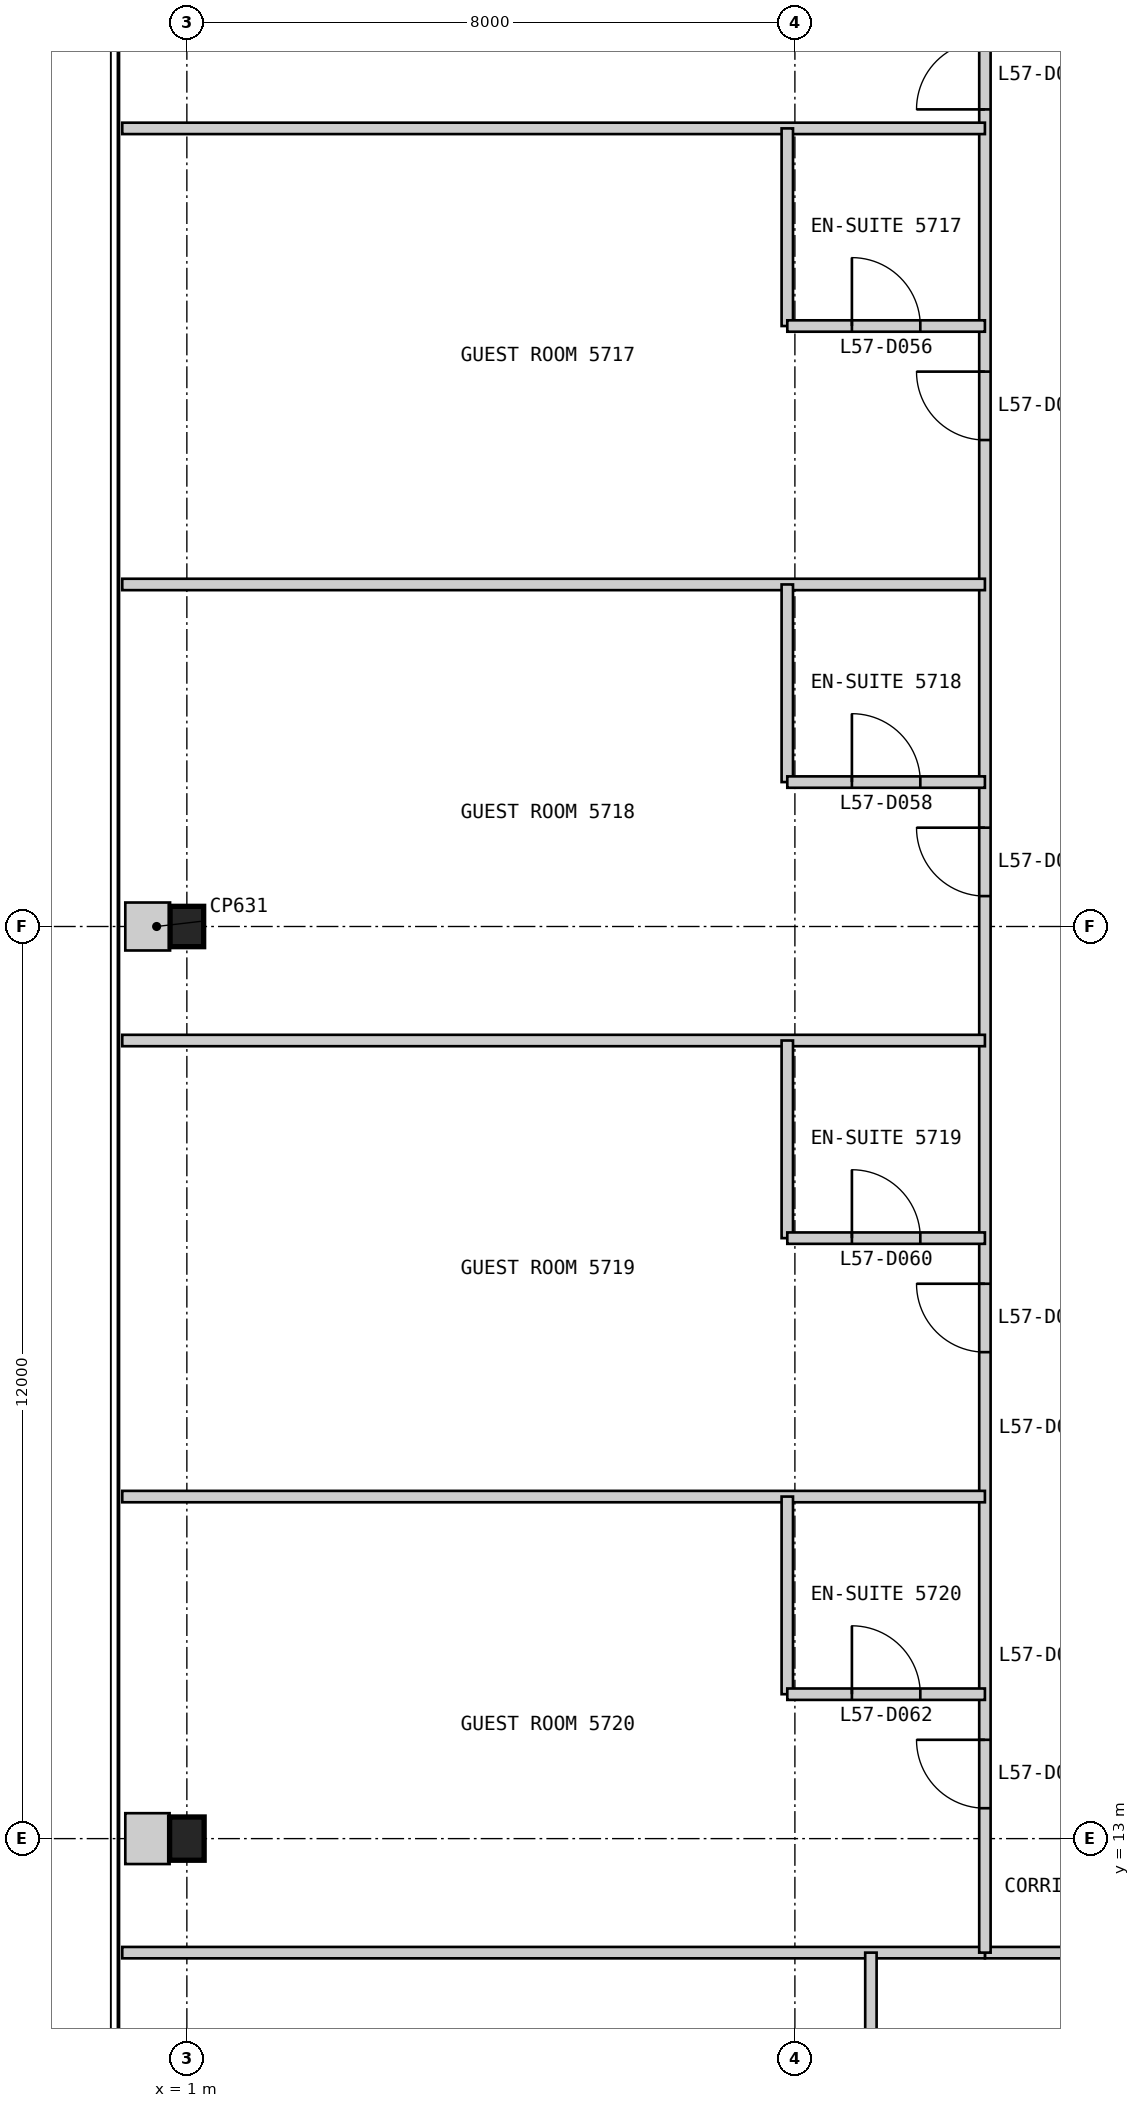
"""IFC4 building model, lengths in metres.
Left out: names, types, materials, properties, quantities, classifications, styles, units other than length and angle.
Written with IfcOpenShell. Run it as: python <this file> out.ifc"""

import sys

from ifc_helpers import new_model, si_unit, direction, frame, frame_2d, origin, origin_2d, place, context, subcontext, project, spatial, rectangle, i_section, extrude, element, fill, save


model = new_model("IFC4")
c1 = context("Model", 3, precision=1e-05, world=origin(), true_north=direction((0.0, 1.0)))
c2 = subcontext(c1, "Body", "Model", "MODEL_VIEW")
j1 = project(units=[si_unit("LENGTHUNIT", "METRE"), si_unit("PLANEANGLEUNIT", "RADIAN")], contexts=[c1])
p1 = place(None, origin())
s1 = spatial("IfcSite", under=j1, at=p1, CompositionType="ELEMENT")
p2 = place(p1, origin())
s2 = spatial("IfcBuilding", under=s1, at=p2, CompositionType="ELEMENT")
p3 = place(p2, frame((0.0, 0.0, 245.8)))
s3 = spatial("IfcBuildingStorey", under=s2, at=p3, CompositionType="ELEMENT", Elevation=245.8)
p4 = place(p3, frame((1.0, 25.0, 0.0), z_axis=(0.0, 0.0, 1.0), x_axis=(1.0, 0.0, 0.0)))
e1 = element("IfcColumn", 1, at=p4, inside=s3, PredefinedType="COLUMN", context=c2, shape_type="SweptSolid", body=[
    extrude(i_section(OverallWidth=0.442, OverallDepth=0.531, WebThickness=0.066, FlangeThickness=0.106, at=origin_2d()), origin(), (0.0, 0.0, 1.0), 3.4),
])
p5 = place(p3, frame((1.0, 13.0, 0.0), z_axis=(0.0, 0.0, 1.0), x_axis=(1.0, 0.0, 0.0)))
e2 = element("IfcColumn", 2, at=p5, inside=s3, PredefinedType="COLUMN", context=c2, shape_type="SweptSolid", body=[
    extrude(i_section(OverallWidth=0.455, OverallDepth=0.569, WebThickness=0.078, FlangeThickness=0.125, at=origin_2d()), origin(), (0.0, 0.0, 1.0), 3.4),
])
p6 = place(p3, frame((11.5, 11.5, 0.0), z_axis=(0.0, 0.0, 1.0), x_axis=(1.0, 0.0, 0.0)))
e3 = element("IfcWall", 3, at=p6, inside=s3, PredefinedType="PARTITIONING", context=c2, shape_type="SweptSolid", body=[
    extrude(rectangle(XDim=27.0, YDim=0.15, at=frame_2d((13.5, 0.0))), origin(), (0.0, 0.0, 1.0), 3.25),
])
p7 = place(p6, frame((1.85, 0.0, 0.0)))
e4 = element("IfcOpeningElement", 4, at=p7, cuts=e3, PredefinedType="OPENING", context=c2, shape_type="SweptSolid", body=[
    extrude(rectangle(XDim=0.9, YDim=2.1, at=frame_2d((0.45, 1.05))), frame((0.0, 0.085, 0.0), z_axis=(0.0, -1.0, 0.0), x_axis=(1.0, 0.0, 0.0)), (0.0, 0.0, 1.0), 0.17),
])
p8 = place(p6, frame((6.2, 0.0, 0.0)))
e5 = element("IfcOpeningElement", 5, at=p8, cuts=e3, PredefinedType="OPENING", context=c2, shape_type="SweptSolid", body=[
    extrude(rectangle(XDim=0.9, YDim=2.1, at=frame_2d((0.45, 1.05))), frame((0.0, 0.085, 0.0), z_axis=(0.0, -1.0, 0.0), x_axis=(1.0, 0.0, 0.0)), (0.0, 0.0, 1.0), 0.17),
])
p9 = place(p6, frame((12.2, 0.0, 0.0)))
e6 = element("IfcOpeningElement", 6, at=p9, cuts=e3, PredefinedType="OPENING", context=c2, shape_type="SweptSolid", body=[
    extrude(rectangle(XDim=0.9, YDim=2.1, at=frame_2d((0.45, 1.05))), frame((0.0, 0.085, 0.0), z_axis=(0.0, -1.0, 0.0), x_axis=(1.0, 0.0, 0.0)), (0.0, 0.0, 1.0), 0.17),
])
p10 = place(p6, frame((18.8, 0.0, 0.0)))
e7 = element("IfcOpeningElement", 7, at=p10, cuts=e3, PredefinedType="OPENING", context=c2, shape_type="SweptSolid", body=[
    extrude(rectangle(XDim=1.0, YDim=2.1, at=frame_2d((0.5, 1.05))), frame((0.0, 0.085, 0.0), z_axis=(0.0, -1.0, 0.0), x_axis=(1.0, 0.0, 0.0)), (0.0, 0.0, 1.0), 0.17),
])
p11 = place(p6, frame((24.2, 0.0, 0.0)))
e8 = element("IfcOpeningElement", 8, at=p11, cuts=e3, PredefinedType="OPENING", context=c2, shape_type="SweptSolid", body=[
    extrude(rectangle(XDim=0.9, YDim=2.1, at=frame_2d((0.45, 1.05))), frame((0.0, 0.085, 0.0), z_axis=(0.0, -1.0, 0.0), x_axis=(1.0, 0.0, 0.0)), (0.0, 0.0, 1.0), 0.17),
])
p12 = place(p3, frame((0.15, 11.5, 0.0), z_axis=(0.0, 0.0, 1.0), x_axis=(1.0, 0.0, 0.0)))
e9 = element("IfcWall", 9, at=p12, inside=s3, PredefinedType="PARTITIONING", context=c2, shape_type="SweptSolid", body=[
    extrude(rectangle(XDim=11.35, YDim=0.15, at=frame_2d((5.675, 0.0))), origin(), (0.0, 0.0, 1.0), 3.25),
])
p13 = place(p3, frame((10.0, 8.9, 0.0), z_axis=(0.0, 0.0, 1.0), x_axis=(0.0, 1.0, 0.0)))
e10 = element("IfcWall", 10, at=p13, inside=s3, PredefinedType="PARTITIONING", context=c2, shape_type="SweptSolid", body=[
    extrude(rectangle(XDim=2.6, YDim=0.15, at=frame_2d((1.3, 0.0))), origin(), (0.0, 0.0, 1.0), 3.25),
])
p14 = place(p3, frame((11.5, 38.5, 0.0), z_axis=(0.0, 0.0, 1.0), x_axis=(0.0, -1.0, 0.0)))
e11 = element("IfcWall", 11, at=p14, inside=s3, PredefinedType="PARTITIONING", context=c2, shape_type="SweptSolid", body=[
    extrude(rectangle(XDim=27.0, YDim=0.15, at=frame_2d((13.5, 0.0))), origin(), (0.0, 0.0, 1.0), 3.25),
])
p15 = place(p14, frame((1.85, 0.0, 0.0)))
e12 = element("IfcOpeningElement", 12, at=p15, cuts=e11, PredefinedType="OPENING", context=c2, shape_type="SweptSolid", body=[
    extrude(rectangle(XDim=0.9, YDim=2.1, at=frame_2d((0.45, 1.05))), frame((0.0, 0.085, 0.0), z_axis=(0.0, -1.0, 0.0), x_axis=(1.0, 0.0, 0.0)), (0.0, 0.0, 1.0), 0.17),
])
p16 = place(p14, frame((6.2, 0.0, 0.0)))
e13 = element("IfcOpeningElement", 13, at=p16, cuts=e11, PredefinedType="OPENING", context=c2, shape_type="SweptSolid", body=[
    extrude(rectangle(XDim=0.9, YDim=2.1, at=frame_2d((0.45, 1.05))), frame((0.0, 0.085, 0.0), z_axis=(0.0, -1.0, 0.0), x_axis=(1.0, 0.0, 0.0)), (0.0, 0.0, 1.0), 0.17),
])
p17 = place(p14, frame((12.2, 0.0, 0.0)))
e14 = element("IfcOpeningElement", 14, at=p17, cuts=e11, PredefinedType="OPENING", context=c2, shape_type="SweptSolid", body=[
    extrude(rectangle(XDim=0.9, YDim=2.1, at=frame_2d((0.45, 1.05))), frame((0.0, 0.085, 0.0), z_axis=(0.0, -1.0, 0.0), x_axis=(1.0, 0.0, 0.0)), (0.0, 0.0, 1.0), 0.17),
])
p18 = place(p14, frame((18.2, 0.0, 0.0)))
e15 = element("IfcOpeningElement", 15, at=p18, cuts=e11, PredefinedType="OPENING", context=c2, shape_type="SweptSolid", body=[
    extrude(rectangle(XDim=0.9, YDim=2.1, at=frame_2d((0.45, 1.05))), frame((0.0, 0.085, 0.0), z_axis=(0.0, -1.0, 0.0), x_axis=(1.0, 0.0, 0.0)), (0.0, 0.0, 1.0), 0.17),
])
p19 = place(p14, frame((24.2, 0.0, 0.0)))
e16 = element("IfcOpeningElement", 16, at=p19, cuts=e11, PredefinedType="OPENING", context=c2, shape_type="SweptSolid", body=[
    extrude(rectangle(XDim=0.9, YDim=2.1, at=frame_2d((0.45, 1.05))), frame((0.0, 0.085, 0.0), z_axis=(0.0, -1.0, 0.0), x_axis=(1.0, 0.0, 0.0)), (0.0, 0.0, 1.0), 0.17),
])
p20 = place(p3, frame((0.15, 35.5, 0.0), z_axis=(0.0, 0.0, 1.0), x_axis=(1.0, 0.0, 0.0)))
e17 = element("IfcWall", 17, at=p20, inside=s3, PredefinedType="PARTITIONING", context=c2, shape_type="SweptSolid", body=[
    extrude(rectangle(XDim=11.35, YDim=0.15, at=frame_2d((5.675, 0.0))), origin(), (0.0, 0.0, 1.0), 3.25),
])
p21 = place(p3, frame((8.9, 35.5, 0.0), z_axis=(0.0, 0.0, 1.0), x_axis=(0.0, -1.0, 0.0)))
e18 = element("IfcWall", 18, at=p21, inside=s3, PredefinedType="PARTITIONING", context=c2, shape_type="SweptSolid", body=[
    extrude(rectangle(XDim=2.6, YDim=0.15, at=frame_2d((1.3, 0.0))), origin(), (0.0, 0.0, 1.0), 3.25),
])
p22 = place(p3, frame((8.9, 32.9, 0.0), z_axis=(0.0, 0.0, 1.0), x_axis=(1.0, 0.0, 0.0)))
e19 = element("IfcWall", 19, at=p22, inside=s3, PredefinedType="PARTITIONING", context=c2, shape_type="SweptSolid", body=[
    extrude(rectangle(XDim=2.6, YDim=0.15, at=frame_2d((1.3, 0.0))), origin(), (0.0, 0.0, 1.0), 3.25),
])
p23 = place(p22, frame((0.85, 0.0, 0.0)))
e20 = element("IfcOpeningElement", 20, at=p23, cuts=e19, PredefinedType="OPENING", context=c2, shape_type="SweptSolid", body=[
    extrude(rectangle(XDim=0.9, YDim=2.1, at=frame_2d((0.45, 1.05))), frame((0.0, 0.085, 0.0), z_axis=(0.0, -1.0, 0.0), x_axis=(1.0, 0.0, 0.0)), (0.0, 0.0, 1.0), 0.17),
])
p24 = place(p3, frame((0.15, 29.5, 0.0), z_axis=(0.0, 0.0, 1.0), x_axis=(1.0, 0.0, 0.0)))
e21 = element("IfcWall", 21, at=p24, inside=s3, PredefinedType="PARTITIONING", context=c2, shape_type="SweptSolid", body=[
    extrude(rectangle(XDim=11.35, YDim=0.15, at=frame_2d((5.675, 0.0))), origin(), (0.0, 0.0, 1.0), 3.25),
])
p25 = place(p3, frame((8.9, 29.5, 0.0), z_axis=(0.0, 0.0, 1.0), x_axis=(0.0, -1.0, 0.0)))
e22 = element("IfcWall", 22, at=p25, inside=s3, PredefinedType="PARTITIONING", context=c2, shape_type="SweptSolid", body=[
    extrude(rectangle(XDim=2.6, YDim=0.15, at=frame_2d((1.3, 0.0))), origin(), (0.0, 0.0, 1.0), 3.25),
])
p26 = place(p3, frame((8.9, 26.9, 0.0), z_axis=(0.0, 0.0, 1.0), x_axis=(1.0, 0.0, 0.0)))
e23 = element("IfcWall", 23, at=p26, inside=s3, PredefinedType="PARTITIONING", context=c2, shape_type="SweptSolid", body=[
    extrude(rectangle(XDim=2.6, YDim=0.15, at=frame_2d((1.3, 0.0))), origin(), (0.0, 0.0, 1.0), 3.25),
])
p27 = place(p26, frame((0.85, 0.0, 0.0)))
e24 = element("IfcOpeningElement", 24, at=p27, cuts=e23, PredefinedType="OPENING", context=c2, shape_type="SweptSolid", body=[
    extrude(rectangle(XDim=0.9, YDim=2.1, at=frame_2d((0.45, 1.05))), frame((0.0, 0.085, 0.0), z_axis=(0.0, -1.0, 0.0), x_axis=(1.0, 0.0, 0.0)), (0.0, 0.0, 1.0), 0.17),
])
p28 = place(p3, frame((0.15, 23.5, 0.0), z_axis=(0.0, 0.0, 1.0), x_axis=(1.0, 0.0, 0.0)))
e25 = element("IfcWall", 25, at=p28, inside=s3, PredefinedType="PARTITIONING", context=c2, shape_type="SweptSolid", body=[
    extrude(rectangle(XDim=11.35, YDim=0.15, at=frame_2d((5.675, 0.0))), origin(), (0.0, 0.0, 1.0), 3.25),
])
p29 = place(p3, frame((8.9, 23.5, 0.0), z_axis=(0.0, 0.0, 1.0), x_axis=(0.0, -1.0, 0.0)))
e26 = element("IfcWall", 26, at=p29, inside=s3, PredefinedType="PARTITIONING", context=c2, shape_type="SweptSolid", body=[
    extrude(rectangle(XDim=2.6, YDim=0.15, at=frame_2d((1.3, 0.0))), origin(), (0.0, 0.0, 1.0), 3.25),
])
p30 = place(p3, frame((8.9, 20.9, 0.0), z_axis=(0.0, 0.0, 1.0), x_axis=(1.0, 0.0, 0.0)))
e27 = element("IfcWall", 27, at=p30, inside=s3, PredefinedType="PARTITIONING", context=c2, shape_type="SweptSolid", body=[
    extrude(rectangle(XDim=2.6, YDim=0.15, at=frame_2d((1.3, 0.0))), origin(), (0.0, 0.0, 1.0), 3.25),
])
p31 = place(p30, frame((0.85, 0.0, 0.0)))
e28 = element("IfcOpeningElement", 28, at=p31, cuts=e27, PredefinedType="OPENING", context=c2, shape_type="SweptSolid", body=[
    extrude(rectangle(XDim=0.9, YDim=2.1, at=frame_2d((0.45, 1.05))), frame((0.0, 0.085, 0.0), z_axis=(0.0, -1.0, 0.0), x_axis=(1.0, 0.0, 0.0)), (0.0, 0.0, 1.0), 0.17),
])
p32 = place(p3, frame((0.15, 17.5, 0.0), z_axis=(0.0, 0.0, 1.0), x_axis=(1.0, 0.0, 0.0)))
e29 = element("IfcWall", 29, at=p32, inside=s3, PredefinedType="PARTITIONING", context=c2, shape_type="SweptSolid", body=[
    extrude(rectangle(XDim=11.35, YDim=0.15, at=frame_2d((5.675, 0.0))), origin(), (0.0, 0.0, 1.0), 3.25),
])
p33 = place(p3, frame((8.9, 17.5, 0.0), z_axis=(0.0, 0.0, 1.0), x_axis=(0.0, -1.0, 0.0)))
e30 = element("IfcWall", 30, at=p33, inside=s3, PredefinedType="PARTITIONING", context=c2, shape_type="SweptSolid", body=[
    extrude(rectangle(XDim=2.6, YDim=0.15, at=frame_2d((1.3, 0.0))), origin(), (0.0, 0.0, 1.0), 3.25),
])
p34 = place(p3, frame((8.9, 14.9, 0.0), z_axis=(0.0, 0.0, 1.0), x_axis=(1.0, 0.0, 0.0)))
e31 = element("IfcWall", 31, at=p34, inside=s3, PredefinedType="PARTITIONING", context=c2, shape_type="SweptSolid", body=[
    extrude(rectangle(XDim=2.6, YDim=0.15, at=frame_2d((1.3, 0.0))), origin(), (0.0, 0.0, 1.0), 3.25),
])
p35 = place(p34, frame((0.85, 0.0, 0.0)))
e32 = element("IfcOpeningElement", 32, at=p35, cuts=e31, PredefinedType="OPENING", context=c2, shape_type="SweptSolid", body=[
    extrude(rectangle(XDim=0.9, YDim=2.1, at=frame_2d((0.45, 1.05))), frame((0.0, 0.085, 0.0), z_axis=(0.0, -1.0, 0.0), x_axis=(1.0, 0.0, 0.0)), (0.0, 0.0, 1.0), 0.17),
])
p36 = place(p3, frame((0.19, 25.0, 0.0), z_axis=(0.0, 0.0, 1.0), x_axis=(1.0, 0.0, 0.0)))
e33 = element("IfcWall", 33, at=p36, inside=s3, PredefinedType="PARTITIONING", context=c2, shape_type="SweptSolid", body=[
    extrude(rectangle(XDim=0.589, YDim=0.631, at=frame_2d((0.294, 0.0))), origin(), (0.0, 0.0, 1.0), 3.25),
])
p37 = place(p3, frame((0.19, 13.0, 0.0), z_axis=(0.0, 0.0, 1.0), x_axis=(1.0, 0.0, 0.0)))
e34 = element("IfcWall", 34, at=p37, inside=s3, PredefinedType="PARTITIONING", context=c2, shape_type="SweptSolid", body=[
    extrude(rectangle(XDim=0.583, YDim=0.669, at=frame_2d((0.292, 0.0))), origin(), (0.0, 0.0, 1.0), 3.25),
])
p38 = place(p15, frame((0.9, 0.0, 0.0), z_axis=(0.0, 0.0, 1.0), x_axis=(-1.0, 0.0, 0.0)))
e35 = element("IfcDoor", 35, at=p38, inside=s3, OperationType="SINGLE_SWING_LEFT", PredefinedType="DOOR", context=c2, shape_type="SweptSolid", body=[
    extrude(rectangle(XDim=0.9, YDim=2.1, at=frame_2d((0.45, 1.05))), frame((0.0, 0.025, 0.0), z_axis=(0.0, -1.0, 0.0), x_axis=(1.0, 0.0, 0.0)), (0.0, 0.0, 1.0), 0.05),
])
fill(e12, e35)
p39 = place(p23, origin())
e36 = element("IfcDoor", 36, at=p39, inside=s3, OperationType="SINGLE_SWING_LEFT", PredefinedType="DOOR", context=c2, shape_type="SweptSolid", body=[
    extrude(rectangle(XDim=0.9, YDim=2.1, at=frame_2d((0.45, 1.05))), frame((0.0, 0.025, 0.0), z_axis=(0.0, -1.0, 0.0), x_axis=(1.0, 0.0, 0.0)), (0.0, 0.0, 1.0), 0.05),
])
fill(e20, e36)
p40 = place(p16, frame((0.9, 0.0, 0.0), z_axis=(0.0, 0.0, 1.0), x_axis=(-1.0, 0.0, 0.0)))
e37 = element("IfcDoor", 37, at=p40, inside=s3, OperationType="SINGLE_SWING_RIGHT", PredefinedType="DOOR", context=c2, shape_type="SweptSolid", body=[
    extrude(rectangle(XDim=0.9, YDim=2.1, at=frame_2d((0.45, 1.05))), frame((0.0, 0.025, 0.0), z_axis=(0.0, -1.0, 0.0), x_axis=(1.0, 0.0, 0.0)), (0.0, 0.0, 1.0), 0.05),
])
fill(e13, e37)
p41 = place(p27, origin())
e38 = element("IfcDoor", 38, at=p41, inside=s3, OperationType="SINGLE_SWING_LEFT", PredefinedType="DOOR", context=c2, shape_type="SweptSolid", body=[
    extrude(rectangle(XDim=0.9, YDim=2.1, at=frame_2d((0.45, 1.05))), frame((0.0, 0.025, 0.0), z_axis=(0.0, -1.0, 0.0), x_axis=(1.0, 0.0, 0.0)), (0.0, 0.0, 1.0), 0.05),
])
fill(e24, e38)
p42 = place(p17, frame((0.9, 0.0, 0.0), z_axis=(0.0, 0.0, 1.0), x_axis=(-1.0, 0.0, 0.0)))
e39 = element("IfcDoor", 39, at=p42, inside=s3, OperationType="SINGLE_SWING_RIGHT", PredefinedType="DOOR", context=c2, shape_type="SweptSolid", body=[
    extrude(rectangle(XDim=0.9, YDim=2.1, at=frame_2d((0.45, 1.05))), frame((0.0, 0.025, 0.0), z_axis=(0.0, -1.0, 0.0), x_axis=(1.0, 0.0, 0.0)), (0.0, 0.0, 1.0), 0.05),
])
fill(e14, e39)
p43 = place(p31, origin())
e40 = element("IfcDoor", 40, at=p43, inside=s3, OperationType="SINGLE_SWING_LEFT", PredefinedType="DOOR", context=c2, shape_type="SweptSolid", body=[
    extrude(rectangle(XDim=0.9, YDim=2.1, at=frame_2d((0.45, 1.05))), frame((0.0, 0.025, 0.0), z_axis=(0.0, -1.0, 0.0), x_axis=(1.0, 0.0, 0.0)), (0.0, 0.0, 1.0), 0.05),
])
fill(e28, e40)
p44 = place(p18, frame((0.9, 0.0, 0.0), z_axis=(0.0, 0.0, 1.0), x_axis=(-1.0, 0.0, 0.0)))
e41 = element("IfcDoor", 41, at=p44, inside=s3, OperationType="SINGLE_SWING_RIGHT", PredefinedType="DOOR", context=c2, shape_type="SweptSolid", body=[
    extrude(rectangle(XDim=0.9, YDim=2.1, at=frame_2d((0.45, 1.05))), frame((0.0, 0.025, 0.0), z_axis=(0.0, -1.0, 0.0), x_axis=(1.0, 0.0, 0.0)), (0.0, 0.0, 1.0), 0.05),
])
fill(e15, e41)
p45 = place(p35, origin())
e42 = element("IfcDoor", 42, at=p45, inside=s3, OperationType="SINGLE_SWING_LEFT", PredefinedType="DOOR", context=c2, shape_type="SweptSolid", body=[
    extrude(rectangle(XDim=0.9, YDim=2.1, at=frame_2d((0.45, 1.05))), frame((0.0, 0.025, 0.0), z_axis=(0.0, -1.0, 0.0), x_axis=(1.0, 0.0, 0.0)), (0.0, 0.0, 1.0), 0.05),
])
fill(e32, e42)
p46 = place(p19, frame((0.9, 0.0, 0.0), z_axis=(0.0, 0.0, 1.0), x_axis=(-1.0, 0.0, 0.0)))
e43 = element("IfcDoor", 43, at=p46, inside=s3, OperationType="SINGLE_SWING_RIGHT", PredefinedType="DOOR", context=c2, shape_type="SweptSolid", body=[
    extrude(rectangle(XDim=0.9, YDim=2.1, at=frame_2d((0.45, 1.05))), frame((0.0, 0.025, 0.0), z_axis=(0.0, -1.0, 0.0), x_axis=(1.0, 0.0, 0.0)), (0.0, 0.0, 1.0), 0.05),
])
fill(e16, e43)
save(model, sys.argv[1])
